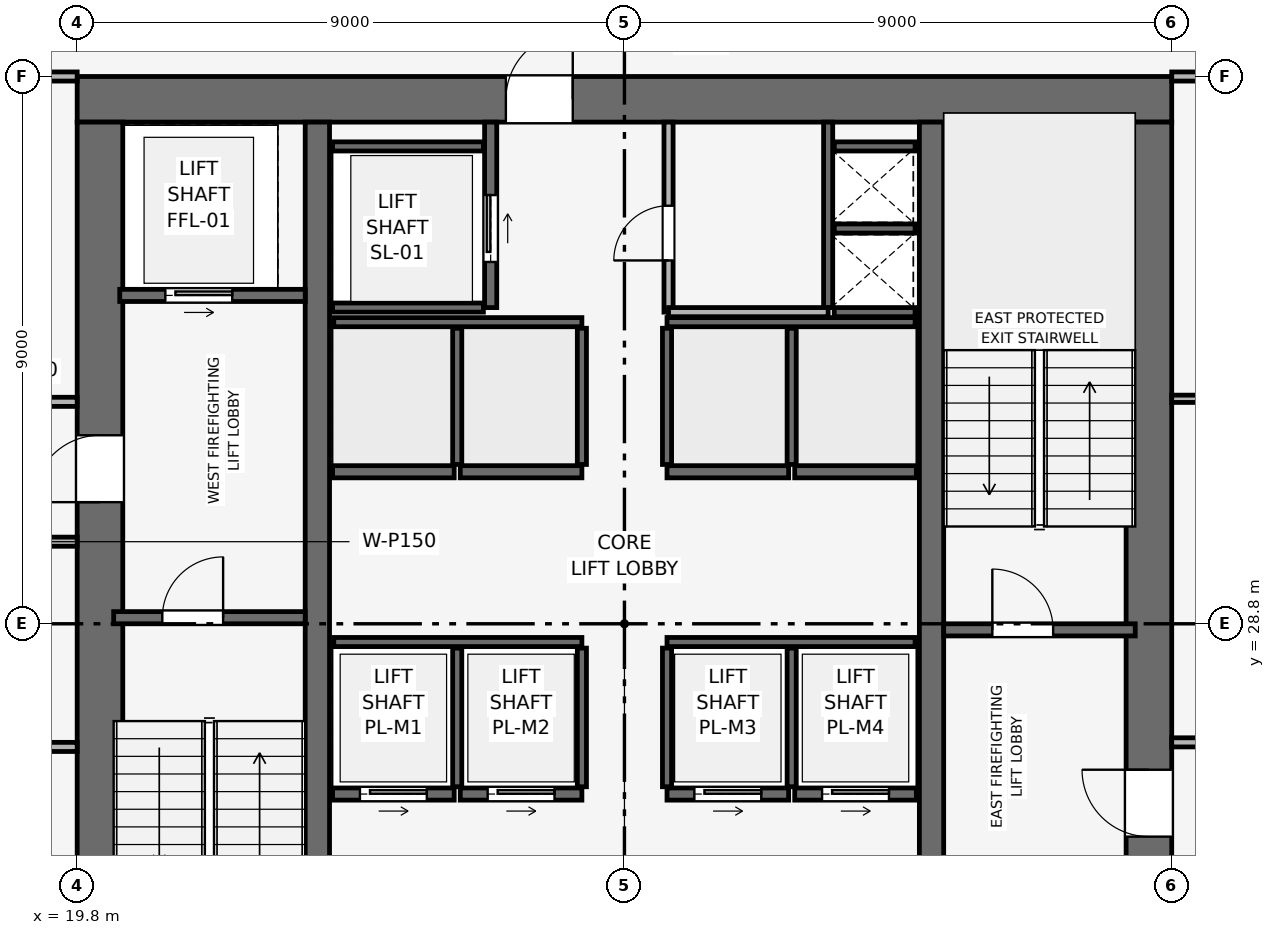
"""IFC4 building model, lengths in metres.
Left out: names, types, materials, properties, quantities, classifications, styles, units other than length and angle.
Written with IfcOpenShell. Run it as: python <this file> out.ifc"""

import sys

from ifc_helpers import new_model, si_unit, direction, frame, frame_2d, origin, place, context, subcontext, project, spatial, rectangle, extrude, element, fill, save


model = new_model("IFC4")
c1 = context("Model", 3, precision=1e-05, world=origin(), true_north=direction((0.0, 1.0)))
c2 = subcontext(c1, "Body", "Model", "MODEL_VIEW")
j1 = project(units=[si_unit("LENGTHUNIT", "METRE"), si_unit("PLANEANGLEUNIT", "RADIAN")], contexts=[c1])
p1 = place(None, origin())
s1 = spatial("IfcSite", under=j1, at=p1, CompositionType="ELEMENT")
p2 = place(p1, origin())
s2 = spatial("IfcBuilding", under=s1, at=p2, CompositionType="ELEMENT")
p3 = place(p2, frame((0.0, 0.0, 237.45)))
s3 = spatial("IfcBuildingStorey", under=s2, at=p3, CompositionType="ELEMENT", Elevation=237.45)
p4 = place(p3, frame((19.8, 37.425, 0.0), z_axis=(0.0, 0.0, 1.0), x_axis=(1.0, 0.0, 0.0)))
e1 = element("IfcWall", 1, at=p4, inside=s3, PredefinedType="SHEAR", context=c2, shape_type="SweptSolid", body=[
    extrude(rectangle(XDim=18.0, YDim=0.75, at=frame_2d((9.0, 0.0))), origin(), (0.0, 0.0, 1.0), 3.75),
])
p5 = place(p4, frame((7.05, 0.0, 0.0)))
e2 = element("IfcOpeningElement", 2, at=p5, cuts=e1, PredefinedType="OPENING", context=c2, shape_type="SweptSolid", body=[
    extrude(rectangle(XDim=1.1, YDim=2.15, at=frame_2d((0.55, 1.075))), frame((0.0, 0.385, 0.0), z_axis=(0.0, -1.0, 0.0), x_axis=(1.0, 0.0, 0.0)), (0.0, 0.0, 1.0), 0.77),
])
p6 = place(p3, frame((20.175, 20.55, 0.0), z_axis=(0.0, 0.0, 1.0), x_axis=(0.0, 1.0, 0.0)))
e3 = element("IfcWall", 3, at=p6, inside=s3, PredefinedType="SHEAR", context=c2, shape_type="SweptSolid", body=[
    extrude(rectangle(XDim=16.5, YDim=0.75, at=frame_2d((8.25, 0.0))), origin(), (0.0, 0.0, 1.0), 3.75),
])
p7 = place(p6, frame((10.25, 0.0, 0.0)))
e4 = element("IfcOpeningElement", 4, at=p7, cuts=e3, PredefinedType="OPENING", context=c2, shape_type="SweptSolid", body=[
    extrude(rectangle(XDim=1.1, YDim=2.15, at=frame_2d((0.55, 1.075))), frame((0.0, 0.385, 0.0), z_axis=(0.0, -1.0, 0.0), x_axis=(1.0, 0.0, 0.0)), (0.0, 0.0, 1.0), 0.77),
])
p8 = place(p3, frame((37.425, 20.55, 0.0), z_axis=(0.0, 0.0, 1.0), x_axis=(0.0, 1.0, 0.0)))
e5 = element("IfcWall", 5, at=p8, inside=s3, PredefinedType="SHEAR", context=c2, shape_type="SweptSolid", body=[
    extrude(rectangle(XDim=16.5, YDim=0.75, at=frame_2d((8.25, 0.0))), origin(), (0.0, 0.0, 1.0), 3.75),
])
p9 = place(p8, frame((4.75, 0.0, 0.0)))
e6 = element("IfcOpeningElement", 6, at=p9, cuts=e5, PredefinedType="OPENING", context=c2, shape_type="SweptSolid", body=[
    extrude(rectangle(XDim=1.1, YDim=2.15, at=frame_2d((0.55, 1.075))), frame((0.0, 0.385, 0.0), z_axis=(0.0, -1.0, 0.0), x_axis=(1.0, 0.0, 0.0)), (0.0, 0.0, 1.0), 0.77),
])
for number, where, z_axis, x_axis in (
    (7, (23.75, 20.55, 0.0), (0.0, 0.0, 1.0), (0.0, 1.0, 0.0)),
    (8, (33.85, 20.55, 0.0), (0.0, 0.0, 1.0), (0.0, 1.0, 0.0)),
):
    element("IfcWall", number, at=place(p3, frame(where, z_axis=z_axis, x_axis=x_axis)), inside=s3, PredefinedType="SHEAR", context=c2, shape_type="SweptSolid", body=[
        extrude(rectangle(XDim=16.5, YDim=0.4, at=frame_2d((8.25, 0.0))), origin(), (0.0, 0.0, 1.0), 3.75),
    ])
p10 = place(p3, frame((20.4, 28.9, 0.0), z_axis=(0.0, 0.0, 1.0), x_axis=(1.0, 0.0, 0.0)))
e9 = element("IfcWall", 9, at=p10, inside=s3, PredefinedType="SHEAR", context=c2, shape_type="SweptSolid", body=[
    extrude(rectangle(XDim=3.15, YDim=0.2, at=frame_2d((1.575, 0.0))), origin(), (0.0, 0.0, 1.0), 3.5),
])
p11 = place(p10, frame((0.8, 0.0, 0.0)))
e10 = element("IfcOpeningElement", 10, at=p11, cuts=e9, PredefinedType="OPENING", context=c2, shape_type="SweptSolid", body=[
    extrude(rectangle(XDim=1.0, YDim=2.1, at=frame_2d((0.5, 1.05))), frame((0.0, 0.11, 0.0), z_axis=(0.0, -1.0, 0.0), x_axis=(1.0, 0.0, 0.0)), (0.0, 0.0, 1.0), 0.22),
])
p12 = place(p3, frame((34.05, 28.7, 0.0), z_axis=(0.0, 0.0, 1.0), x_axis=(1.0, 0.0, 0.0)))
e11 = element("IfcWall", 11, at=p12, inside=s3, PredefinedType="SHEAR", context=c2, shape_type="SweptSolid", body=[
    extrude(rectangle(XDim=3.15, YDim=0.2, at=frame_2d((1.575, 0.0))), origin(), (0.0, 0.0, 1.0), 3.5),
])
p13 = place(p12, frame((0.8, 0.0, 0.0)))
e12 = element("IfcOpeningElement", 12, at=p13, cuts=e11, PredefinedType="OPENING", context=c2, shape_type="SweptSolid", body=[
    extrude(rectangle(XDim=1.0, YDim=2.1, at=frame_2d((0.5, 1.05))), frame((0.0, 0.11, 0.0), z_axis=(0.0, -1.0, 0.0), x_axis=(1.0, 0.0, 0.0)), (0.0, 0.0, 1.0), 0.22),
])
p14 = place(p3, frame((32.15, 34.0, 0.0), z_axis=(0.0, 0.0, 1.0), x_axis=(0.0, 1.0, 0.0)))
e13 = element("IfcWall", 13, at=p14, inside=s3, PredefinedType="SHEAR", context=c2, shape_type="SweptSolid", body=[
    extrude(rectangle(XDim=3.05, YDim=0.15, at=frame_2d((1.525, 0.0))), origin(), (0.0, 0.0, 1.0), 3.5),
])
for number, where, z_axis, x_axis in (
    (14, (32.25, 33.925, 0.0), (0.0, 0.0, 1.0), (1.0, 0.0, 0.0)),
    (15, (32.25, 35.3, 0.0), (0.0, 0.0, 1.0), (1.0, 0.0, 0.0)),
):
    element("IfcWall", number, at=place(p3, frame(where, z_axis=z_axis, x_axis=x_axis)), inside=s3, PredefinedType="SHEAR", context=c2, shape_type="SweptSolid", body=[
        extrude(rectangle(XDim=1.33, YDim=0.15, at=frame_2d((0.665, 0.0))), origin(), (0.0, 0.0, 1.0), 3.5),
    ])
p15 = place(p3, frame((20.5, 34.2, 0.0), z_axis=(0.0, 0.0, 1.0), x_axis=(1.0, 0.0, 0.0)))
e16 = element("IfcWall", 16, at=p15, inside=s3, PredefinedType="SHEAR", context=c2, shape_type="SweptSolid", body=[
    extrude(rectangle(XDim=3.05, YDim=0.2, at=frame_2d((1.525, 0.0))), origin(), (0.0, 0.0, 1.0), 3.5),
])
p16 = place(p15, frame((0.75, 0.0, 0.0)))
e17 = element("IfcOpeningElement", 17, at=p16, cuts=e16, PredefinedType="OPENING", context=c2, shape_type="SweptSolid", body=[
    extrude(rectangle(XDim=1.1, YDim=2.15, at=frame_2d((0.55, 1.075))), frame((0.0, 0.11, 0.0), z_axis=(0.0, -1.0, 0.0), x_axis=(1.0, 0.0, 0.0)), (0.0, 0.0, 1.0), 0.22),
])
p17 = place(p3, frame((26.6, 34.0, 0.0), z_axis=(0.0, 0.0, 1.0), x_axis=(0.0, 1.0, 0.0)))
e18 = element("IfcWall", 18, at=p17, inside=s3, PredefinedType="SHEAR", context=c2, shape_type="SweptSolid", body=[
    extrude(rectangle(XDim=3.05, YDim=0.2, at=frame_2d((1.525, 0.0))), origin(), (0.0, 0.0, 1.0), 3.5),
])
p18 = place(p17, frame((0.75, 0.0, 0.0)))
e19 = element("IfcOpeningElement", 19, at=p18, cuts=e18, PredefinedType="OPENING", context=c2, shape_type="SweptSolid", body=[
    extrude(rectangle(XDim=1.1, YDim=2.15, at=frame_2d((0.55, 1.075))), frame((0.0, 0.11, 0.0), z_axis=(0.0, -1.0, 0.0), x_axis=(1.0, 0.0, 0.0)), (0.0, 0.0, 1.0), 0.22),
])
for number, where, z_axis, x_axis in (
    (20, (24.0, 34.0, 0.0), (0.0, 0.0, 1.0), (1.0, 0.0, 0.0)),
    (21, (24.0, 36.65, 0.0), (0.0, 0.0, 1.0), (1.0, 0.0, 0.0)),
):
    element("IfcWall", number, at=place(p3, frame(where, z_axis=z_axis, x_axis=x_axis)), inside=s3, PredefinedType="SHEAR", context=c2, shape_type="SweptSolid", body=[
        extrude(rectangle(XDim=2.48, YDim=0.15, at=frame_2d((1.24, 0.0))), origin(), (0.0, 0.0, 1.0), 3.5),
    ])
p19 = place(p3, frame((24.0, 26.0, 0.0), z_axis=(0.0, 0.0, 1.0), x_axis=(1.0, 0.0, 0.0)))
e22 = element("IfcWall", 22, at=p19, inside=s3, PredefinedType="SHEAR", context=c2, shape_type="SweptSolid", body=[
    extrude(rectangle(XDim=2.0, YDim=0.2, at=frame_2d((1.0, 0.0))), origin(), (0.0, 0.0, 1.0), 3.5),
])
p20 = place(p19, frame((0.45, 0.0, 0.0)))
e23 = element("IfcOpeningElement", 23, at=p20, cuts=e22, PredefinedType="OPENING", context=c2, shape_type="SweptSolid", body=[
    extrude(rectangle(XDim=1.1, YDim=2.15, at=frame_2d((0.55, 1.075))), frame((0.0, 0.11, 0.0), z_axis=(0.0, -1.0, 0.0), x_axis=(1.0, 0.0, 0.0)), (0.0, 0.0, 1.0), 0.22),
])
p21 = place(p3, frame((26.1, 26.0, 0.0), z_axis=(0.0, 0.0, 1.0), x_axis=(1.0, 0.0, 0.0)))
e24 = element("IfcWall", 24, at=p21, inside=s3, PredefinedType="SHEAR", context=c2, shape_type="SweptSolid", body=[
    extrude(rectangle(XDim=2.0, YDim=0.2, at=frame_2d((1.0, 0.0))), origin(), (0.0, 0.0, 1.0), 3.5),
])
p22 = place(p21, frame((0.45, 0.0, 0.0)))
e25 = element("IfcOpeningElement", 25, at=p22, cuts=e24, PredefinedType="OPENING", context=c2, shape_type="SweptSolid", body=[
    extrude(rectangle(XDim=1.1, YDim=2.15, at=frame_2d((0.55, 1.075))), frame((0.0, 0.11, 0.0), z_axis=(0.0, -1.0, 0.0), x_axis=(1.0, 0.0, 0.0)), (0.0, 0.0, 1.0), 0.22),
])
p23 = place(p3, frame((29.5, 26.0, 0.0), z_axis=(0.0, 0.0, 1.0), x_axis=(1.0, 0.0, 0.0)))
e26 = element("IfcWall", 26, at=p23, inside=s3, PredefinedType="SHEAR", context=c2, shape_type="SweptSolid", body=[
    extrude(rectangle(XDim=2.0, YDim=0.2, at=frame_2d((1.0, 0.0))), origin(), (0.0, 0.0, 1.0), 3.5),
])
p24 = place(p23, frame((0.45, 0.0, 0.0)))
e27 = element("IfcOpeningElement", 27, at=p24, cuts=e26, PredefinedType="OPENING", context=c2, shape_type="SweptSolid", body=[
    extrude(rectangle(XDim=1.1, YDim=2.15, at=frame_2d((0.55, 1.075))), frame((0.0, 0.11, 0.0), z_axis=(0.0, -1.0, 0.0), x_axis=(1.0, 0.0, 0.0)), (0.0, 0.0, 1.0), 0.22),
])
p25 = place(p3, frame((31.6, 26.0, 0.0), z_axis=(0.0, 0.0, 1.0), x_axis=(1.0, 0.0, 0.0)))
e28 = element("IfcWall", 28, at=p25, inside=s3, PredefinedType="SHEAR", context=c2, shape_type="SweptSolid", body=[
    extrude(rectangle(XDim=2.0, YDim=0.2, at=frame_2d((1.0, 0.0))), origin(), (0.0, 0.0, 1.0), 3.5),
])
p26 = place(p25, frame((0.45, 0.0, 0.0)))
e29 = element("IfcOpeningElement", 29, at=p26, cuts=e28, PredefinedType="OPENING", context=c2, shape_type="SweptSolid", body=[
    extrude(rectangle(XDim=1.1, YDim=2.15, at=frame_2d((0.55, 1.075))), frame((0.0, 0.11, 0.0), z_axis=(0.0, -1.0, 0.0), x_axis=(1.0, 0.0, 0.0)), (0.0, 0.0, 1.0), 0.22),
])
for number, where, z_axis, x_axis in (
    (30, (24.0, 31.3, 0.0), (0.0, 0.0, 1.0), (1.0, 0.0, 0.0)),
    (31, (26.1, 31.3, 0.0), (0.0, 0.0, 1.0), (1.0, 0.0, 0.0)),
    (32, (29.5, 31.3, 0.0), (0.0, 0.0, 1.0), (1.0, 0.0, 0.0)),
    (33, (31.6, 31.3, 0.0), (0.0, 0.0, 1.0), (1.0, 0.0, 0.0)),
):
    element("IfcWall", number, at=place(p3, frame(where, z_axis=z_axis, x_axis=x_axis)), inside=s3, PredefinedType="SHEAR", context=c2, shape_type="SweptSolid", body=[
        extrude(rectangle(XDim=2.0, YDim=0.2, at=frame_2d((1.0, 0.0))), origin(), (0.0, 0.0, 1.0), 3.5),
    ])
p27 = place(p3, frame((32.25, 36.65, 0.0), z_axis=(0.0, 0.0, 1.0), x_axis=(1.0, 0.0, 0.0)))
e34 = element("IfcWall", 34, at=p27, inside=s3, PredefinedType="SHEAR", context=c2, shape_type="SweptSolid", body=[
    extrude(rectangle(XDim=1.33, YDim=0.15, at=frame_2d((0.665, 0.0))), origin(), (0.0, 0.0, 1.0), 3.5),
])
for number, where, z_axis, x_axis in (
    (35, (24.02, 28.5, 0.0), (0.0, 0.0, 1.0), (1.0, 0.0, 0.0)),
    (36, (29.5, 28.5, 0.0), (0.0, 0.0, 1.0), (1.0, 0.0, 0.0)),
):
    element("IfcWall", number, at=place(p3, frame(where, z_axis=z_axis, x_axis=x_axis)), inside=s3, PredefinedType="SHEAR", context=c2, shape_type="SweptSolid", body=[
        extrude(rectangle(XDim=4.08, YDim=0.15, at=frame_2d((2.04, 0.0))), origin(), (0.0, 0.0, 1.0), 3.5),
    ])
for number, where, z_axis, x_axis in (
    (37, (26.05, 26.12, 0.0), (0.0, 0.0, 1.0), (0.0, 1.0, 0.0)),
    (38, (28.1, 26.12, 0.0), (0.0, 0.0, 1.0), (0.0, 1.0, 0.0)),
    (39, (29.5, 26.12, 0.0), (0.0, 0.0, 1.0), (0.0, 1.0, 0.0)),
    (40, (31.55, 26.12, 0.0), (0.0, 0.0, 1.0), (0.0, 1.0, 0.0)),
):
    element("IfcWall", number, at=place(p3, frame(where, z_axis=z_axis, x_axis=x_axis)), inside=s3, PredefinedType="SHEAR", context=c2, shape_type="SweptSolid", body=[
        extrude(rectangle(XDim=2.28, YDim=0.15, at=frame_2d((1.14, 0.0))), origin(), (0.0, 0.0, 1.0), 3.5),
    ])
for number, where, z_axis, x_axis in (
    (41, (24.02, 33.76, 0.0), (0.0, 0.0, 1.0), (1.0, 0.0, 0.0)),
    (42, (29.5, 33.76, 0.0), (0.0, 0.0, 1.0), (1.0, 0.0, 0.0)),
):
    element("IfcWall", number, at=place(p3, frame(where, z_axis=z_axis, x_axis=x_axis)), inside=s3, PredefinedType="SHEAR", context=c2, shape_type="SweptSolid", body=[
        extrude(rectangle(XDim=4.08, YDim=0.15, at=frame_2d((2.04, 0.0))), origin(), (0.0, 0.0, 1.0), 3.5),
    ])
for number, where, z_axis, x_axis in (
    (43, (26.05, 31.42, 0.0), (0.0, 0.0, 1.0), (0.0, 1.0, 0.0)),
    (44, (28.1, 31.42, 0.0), (0.0, 0.0, 1.0), (0.0, 1.0, 0.0)),
    (45, (29.5, 31.42, 0.0), (0.0, 0.0, 1.0), (0.0, 1.0, 0.0)),
    (46, (31.55, 31.42, 0.0), (0.0, 0.0, 1.0), (0.0, 1.0, 0.0)),
):
    element("IfcWall", number, at=place(p3, frame(where, z_axis=z_axis, x_axis=x_axis)), inside=s3, PredefinedType="SHEAR", context=c2, shape_type="SweptSolid", body=[
        extrude(rectangle(XDim=2.24, YDim=0.15, at=frame_2d((1.12, 0.0))), origin(), (0.0, 0.0, 1.0), 3.5),
    ])
p28 = place(p3, frame((29.525, 33.925, 0.0), z_axis=(0.0, 0.0, 1.0), x_axis=(0.0, 1.0, 0.0)))
e47 = element("IfcWall", 47, at=p28, inside=s3, PredefinedType="PARTITIONING", context=c2, shape_type="SweptSolid", body=[
    extrude(rectangle(XDim=3.125, YDim=0.15, at=frame_2d((1.562, 0.0))), origin(), (0.0, 0.0, 1.0), 3.5),
])
p29 = place(p28, frame((0.85, 0.0, 0.0)))
e48 = element("IfcOpeningElement", 48, at=p29, cuts=e47, PredefinedType="OPENING", context=c2, shape_type="SweptSolid", body=[
    extrude(rectangle(XDim=0.9, YDim=2.1, at=frame_2d((0.45, 1.05))), frame((0.0, 0.085, 0.0), z_axis=(0.0, -1.0, 0.0), x_axis=(1.0, 0.0, 0.0)), (0.0, 0.0, 1.0), 0.17),
])
p30 = place(p3, frame((29.525, 33.925, 0.0), z_axis=(0.0, 0.0, 1.0), x_axis=(1.0, 0.0, 0.0)))
e49 = element("IfcWall", 49, at=p30, inside=s3, PredefinedType="PARTITIONING", context=c2, shape_type="SweptSolid", body=[
    extrude(rectangle(XDim=2.625, YDim=0.15, at=frame_2d((1.312, 0.0))), origin(), (0.0, 0.0, 1.0), 3.5),
])
for number, where, z_axis, x_axis in (
    (50, (15.4, 26.775, 0.0), (0.0, 0.0, 1.0), (1.0, 0.0, 0.0)),
    (51, (15.4, 30.15, 0.0), (0.0, 0.0, 1.0), (1.0, 0.0, 0.0)),
    (52, (15.4, 32.45, 0.0), (0.0, 0.0, 1.0), (1.0, 0.0, 0.0)),
):
    element("IfcWall", number, at=place(p3, frame(where, z_axis=z_axis, x_axis=x_axis)), inside=s3, PredefinedType="PARTITIONING", context=c2, shape_type="SweptSolid", body=[
        extrude(rectangle(XDim=4.4, YDim=0.15, at=frame_2d((2.2, 0.0))), origin(), (0.0, 0.0, 1.0), 3.5),
    ])
p31 = place(p3, frame((15.4, 37.8, 0.0), z_axis=(0.0, 0.0, 1.0), x_axis=(1.0, 0.0, 0.0)))
e53 = element("IfcWall", 53, at=p31, inside=s3, PredefinedType="PARTITIONING", context=c2, shape_type="SweptSolid", body=[
    extrude(rectangle(XDim=4.4, YDim=0.15, at=frame_2d((2.2, 0.0))), origin(), (0.0, 0.0, 1.0), 3.035),
])
p32 = place(p3, frame((37.8, 26.85, 0.0), z_axis=(0.0, 0.0, 1.0), x_axis=(1.0, 0.0, 0.0)))
e54 = element("IfcWall", 54, at=p32, inside=s3, PredefinedType="PARTITIONING", context=c2, shape_type="SweptSolid", body=[
    extrude(rectangle(XDim=2.25, YDim=0.15, at=frame_2d((1.125, 0.0))), origin(), (0.0, 0.0, 1.0), 3.5),
])
p33 = place(p3, frame((37.8, 32.5, 0.0), z_axis=(0.0, 0.0, 1.0), x_axis=(1.0, 0.0, 0.0)))
e55 = element("IfcWall", 55, at=p33, inside=s3, PredefinedType="PARTITIONING", context=c2, shape_type="SweptSolid", body=[
    extrude(rectangle(XDim=17.87, YDim=0.12, at=frame_2d((8.935, 0.0))), origin(), (0.0, 0.0, 1.0), 2.685),
])
p34 = place(p3, frame((37.8, 37.8, 0.0), z_axis=(0.0, 0.0, 1.0), x_axis=(1.0, 0.0, 0.0)))
e56 = element("IfcWall", 56, at=p34, inside=s3, PredefinedType="PARTITIONING", context=c2, shape_type="SweptSolid", body=[
    extrude(rectangle(XDim=17.87, YDim=0.15, at=frame_2d((8.935, 0.0))), origin(), (0.0, 0.0, 1.0), 2.685),
])
p35 = place(p34, frame((3.4, 0.0, 0.0)))
e57 = element("IfcOpeningElement", 57, at=p35, cuts=e56, PredefinedType="OPENING", context=c2, shape_type="SweptSolid", body=[
    extrude(rectangle(XDim=0.9, YDim=2.1, at=frame_2d((0.45, 1.05))), frame((0.0, 0.085, 0.0), z_axis=(0.0, -1.0, 0.0), x_axis=(1.0, 0.0, 0.0)), (0.0, 0.0, 1.0), 0.17),
])
p36 = place(p11, origin())
e58 = element("IfcDoor", 58, at=p36, inside=s3, OperationType="SINGLE_SWING_RIGHT", PredefinedType="DOOR", context=c2, shape_type="SweptSolid", body=[
    extrude(rectangle(XDim=1.0, YDim=2.1, at=frame_2d((0.5, 1.05))), frame((0.0, 0.025, 0.0), z_axis=(0.0, -1.0, 0.0), x_axis=(1.0, 0.0, 0.0)), (0.0, 0.0, 1.0), 0.05),
])
fill(e10, e58)
p37 = place(p13, origin())
e59 = element("IfcDoor", 59, at=p37, inside=s3, OperationType="SINGLE_SWING_LEFT", PredefinedType="DOOR", context=c2, shape_type="SweptSolid", body=[
    extrude(rectangle(XDim=1.0, YDim=2.1, at=frame_2d((0.5, 1.05))), frame((0.0, 0.025, 0.0), z_axis=(0.0, -1.0, 0.0), x_axis=(1.0, 0.0, 0.0)), (0.0, 0.0, 1.0), 0.05),
])
fill(e12, e59)
p38 = place(p16, origin())
e60 = element("IfcDoor", 60, at=p38, inside=s3, OperationType="SLIDING_TO_RIGHT", PredefinedType="DOOR", context=c2, shape_type="SweptSolid", body=[
    extrude(rectangle(XDim=1.1, YDim=2.15, at=frame_2d((0.55, 1.075))), frame((0.0, 0.025, 0.0), z_axis=(0.0, -1.0, 0.0), x_axis=(1.0, 0.0, 0.0)), (0.0, 0.0, 1.0), 0.05),
])
fill(e17, e60)
p39 = place(p18, origin())
e61 = element("IfcDoor", 61, at=p39, inside=s3, OperationType="SLIDING_TO_RIGHT", PredefinedType="DOOR", context=c2, shape_type="SweptSolid", body=[
    extrude(rectangle(XDim=1.1, YDim=2.15, at=frame_2d((0.55, 1.075))), frame((0.0, 0.025, 0.0), z_axis=(0.0, -1.0, 0.0), x_axis=(1.0, 0.0, 0.0)), (0.0, 0.0, 1.0), 0.05),
])
fill(e19, e61)
p40 = place(p20, origin())
e62 = element("IfcDoor", 62, at=p40, inside=s3, OperationType="SLIDING_TO_RIGHT", PredefinedType="DOOR", context=c2, shape_type="SweptSolid", body=[
    extrude(rectangle(XDim=1.1, YDim=2.15, at=frame_2d((0.55, 1.075))), frame((0.0, 0.025, 0.0), z_axis=(0.0, -1.0, 0.0), x_axis=(1.0, 0.0, 0.0)), (0.0, 0.0, 1.0), 0.05),
])
fill(e23, e62)
p41 = place(p22, origin())
e63 = element("IfcDoor", 63, at=p41, inside=s3, OperationType="SLIDING_TO_RIGHT", PredefinedType="DOOR", context=c2, shape_type="SweptSolid", body=[
    extrude(rectangle(XDim=1.1, YDim=2.15, at=frame_2d((0.55, 1.075))), frame((0.0, 0.025, 0.0), z_axis=(0.0, -1.0, 0.0), x_axis=(1.0, 0.0, 0.0)), (0.0, 0.0, 1.0), 0.05),
])
fill(e25, e63)
p42 = place(p24, origin())
e64 = element("IfcDoor", 64, at=p42, inside=s3, OperationType="SLIDING_TO_RIGHT", PredefinedType="DOOR", context=c2, shape_type="SweptSolid", body=[
    extrude(rectangle(XDim=1.1, YDim=2.15, at=frame_2d((0.55, 1.075))), frame((0.0, 0.025, 0.0), z_axis=(0.0, -1.0, 0.0), x_axis=(1.0, 0.0, 0.0)), (0.0, 0.0, 1.0), 0.05),
])
fill(e27, e64)
p43 = place(p26, origin())
e65 = element("IfcDoor", 65, at=p43, inside=s3, OperationType="SLIDING_TO_RIGHT", PredefinedType="DOOR", context=c2, shape_type="SweptSolid", body=[
    extrude(rectangle(XDim=1.1, YDim=2.15, at=frame_2d((0.55, 1.075))), frame((0.0, 0.025, 0.0), z_axis=(0.0, -1.0, 0.0), x_axis=(1.0, 0.0, 0.0)), (0.0, 0.0, 1.0), 0.05),
])
fill(e29, e65)
p44 = place(p29, origin())
e66 = element("IfcDoor", 66, at=p44, inside=s3, OperationType="SINGLE_SWING_LEFT", PredefinedType="DOOR", context=c2, shape_type="SweptSolid", body=[
    extrude(rectangle(XDim=0.9, YDim=2.1, at=frame_2d((0.45, 1.05))), frame((0.0, 0.025, 0.0), z_axis=(0.0, -1.0, 0.0), x_axis=(1.0, 0.0, 0.0)), (0.0, 0.0, 1.0), 0.05),
])
fill(e48, e66)
p45 = place(p7, origin())
e67 = element("IfcDoor", 67, at=p45, inside=s3, OperationType="SINGLE_SWING_LEFT", PredefinedType="DOOR", context=c2, shape_type="SweptSolid", body=[
    extrude(rectangle(XDim=1.1, YDim=2.15, at=frame_2d((0.55, 1.075))), frame((0.0, 0.025, 0.0), z_axis=(0.0, -1.0, 0.0), x_axis=(1.0, 0.0, 0.0)), (0.0, 0.0, 1.0), 0.05),
])
fill(e4, e67)
p46 = place(p9, origin())
e68 = element("IfcDoor", 68, at=p46, inside=s3, OperationType="SINGLE_SWING_RIGHT", PredefinedType="DOOR", context=c2, shape_type="SweptSolid", body=[
    extrude(rectangle(XDim=1.1, YDim=2.15, at=frame_2d((0.55, 1.075))), frame((0.0, 0.025, 0.0), z_axis=(0.0, -1.0, 0.0), x_axis=(1.0, 0.0, 0.0)), (0.0, 0.0, 1.0), 0.05),
])
fill(e6, e68)
p47 = place(p5, origin())
e69 = element("IfcDoor", 69, at=p47, inside=s3, OperationType="SINGLE_SWING_RIGHT", PredefinedType="DOOR", context=c2, shape_type="SweptSolid", body=[
    extrude(rectangle(XDim=1.1, YDim=2.15, at=frame_2d((0.55, 1.075))), frame((0.0, 0.025, 0.0), z_axis=(0.0, -1.0, 0.0), x_axis=(1.0, 0.0, 0.0)), (0.0, 0.0, 1.0), 0.05),
])
fill(e2, e69)
save(model, sys.argv[1])
